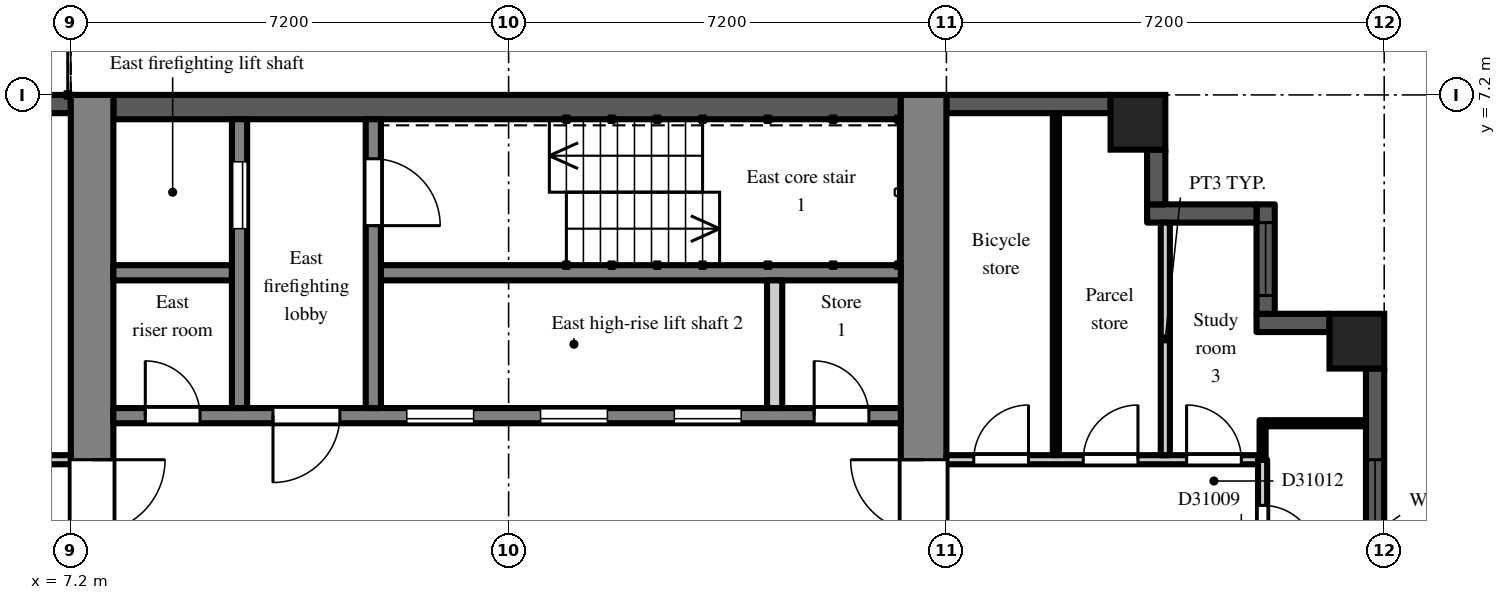
"""IFC4 building model, lengths in metres.
Left out: names, types, materials, properties, quantities, classifications, styles, units other than length and angle.
Written with IfcOpenShell. Run it as: python <this file> out.ifc"""

import sys

from ifc_helpers import new_model, si_unit, direction, frame, frame_2d, origin, origin_2d, place, context, subcontext, project, spatial, rectangle, extrude, element, fill, save


model = new_model("IFC4")
c1 = context("Model", 3, precision=1e-05, world=origin(), true_north=direction((0.0, 1.0)))
c2 = subcontext(c1, "Body", "Model", "MODEL_VIEW")
j1 = project(units=[si_unit("LENGTHUNIT", "METRE"), si_unit("PLANEANGLEUNIT", "RADIAN")], contexts=[c1])
p1 = place(None, origin())
s1 = spatial("IfcSite", under=j1, at=p1, CompositionType="ELEMENT")
p2 = place(p1, origin())
s2 = spatial("IfcBuilding", under=s1, at=p2, CompositionType="ELEMENT")
p3 = place(p2, frame((0.0, 0.0, 216.9)))
s3 = spatial("IfcBuildingStorey", under=s2, at=p3, CompositionType="ELEMENT", Elevation=216.9)
for number, where, z_axis, x_axis in (
    (1, (24.75, 6.75, 0.0), (0.0, 0.0, 1.0), (1.0, 0.0, 0.0)),
    (2, (28.35, 3.15, 0.0), (0.0, 0.0, 1.0), (1.0, 0.0, 0.0)),
):
    element("IfcColumn", number, at=place(p3, frame(where, z_axis=z_axis, x_axis=x_axis)), inside=s3, PredefinedType="COLUMN", context=c2, shape_type="SweptSolid", body=[
        extrude(rectangle(XDim=0.9, YDim=0.9, at=origin_2d()), origin(), (0.0, 0.0, 1.0), 3.0),
    ])
p4 = place(p3, frame((28.65, -2.7, 0.0), z_axis=(0.0, 0.0, 1.0), x_axis=(0.0, 1.0, 0.0)))
e3 = element("IfcWall", 3, at=p4, inside=s3, PredefinedType="SOLIDWALL", context=c2, shape_type="SweptSolid", body=[
    extrude(rectangle(XDim=5.4, YDim=0.3, at=frame_2d((2.7, 0.0))), origin(), (0.0, 0.0, 1.0), 2.3),
])
p5 = place(p4, frame((1.5, 0.0, 0.2)))
e4 = element("IfcOpeningElement", 4, at=p5, cuts=e3, PredefinedType="OPENING", context=c2, shape_type="SweptSolid", body=[
    extrude(rectangle(XDim=2.4, YDim=1.85, at=frame_2d((1.2, 0.925))), frame((0.0, 0.16, 0.0), z_axis=(0.0, -1.0, 0.0), x_axis=(1.0, 0.0, 0.0)), (0.0, 0.0, 1.0), 0.32),
])
p6 = place(p3, frame((27.9, 3.45, 0.0), z_axis=(0.0, 0.0, 1.0), x_axis=(-1.0, 0.0, 0.0)))
e5 = element("IfcWall", 5, at=p6, inside=s3, PredefinedType="SOLIDWALL", context=c2, shape_type="SweptSolid", body=[
    extrude(rectangle(XDim=1.2, YDim=0.3, at=frame_2d((0.6, 0.0))), origin(), (0.0, 0.0, 1.0), 2.6),
])
p7 = place(p3, frame((26.85, 3.6, 0.0), z_axis=(0.0, 0.0, 1.0), x_axis=(0.0, 1.0, 0.0)))
e6 = element("IfcWall", 6, at=p7, inside=s3, PredefinedType="SOLIDWALL", context=c2, shape_type="SweptSolid", body=[
    extrude(rectangle(XDim=1.8, YDim=0.3, at=frame_2d((0.9, 0.0))), origin(), (0.0, 0.0, 1.0), 2.6),
])
p8 = place(p7, frame((0.3, 0.0, 0.2)))
e7 = element("IfcOpeningElement", 7, at=p8, cuts=e6, PredefinedType="OPENING", context=c2, shape_type="SweptSolid", body=[
    extrude(rectangle(XDim=1.2, YDim=1.85, at=frame_2d((0.6, 0.925))), frame((0.0, 0.16, 0.0), z_axis=(0.0, -1.0, 0.0), x_axis=(1.0, 0.0, 0.0)), (0.0, 0.0, 1.0), 0.32),
])
p9 = place(p3, frame((26.7, 5.25, 0.0), z_axis=(0.0, 0.0, 1.0), x_axis=(-1.0, 0.0, 0.0)))
e8 = element("IfcWall", 8, at=p9, inside=s3, PredefinedType="SOLIDWALL", context=c2, shape_type="SweptSolid", body=[
    extrude(rectangle(XDim=1.8, YDim=0.3, at=frame_2d((0.9, 0.0))), origin(), (0.0, 0.0, 1.0), 2.6),
])
p10 = place(p3, frame((25.05, 5.4, 0.0), z_axis=(0.0, 0.0, 1.0), x_axis=(0.0, 1.0, 0.0)))
e9 = element("IfcWall", 9, at=p10, inside=s3, PredefinedType="SOLIDWALL", context=c2, shape_type="SweptSolid", body=[
    extrude(rectangle(XDim=0.9, YDim=0.3, at=frame_2d((0.45, 0.0))), origin(), (0.0, 0.0, 1.0), 2.6),
])
p11 = place(p3, frame((24.3, 7.05, 0.0), z_axis=(0.0, 0.0, 1.0), x_axis=(-1.0, 0.0, 0.0)))
e10 = element("IfcWall", 10, at=p11, inside=s3, PredefinedType="SOLIDWALL", context=c2, shape_type="SweptSolid", body=[
    extrude(rectangle(XDim=2.7, YDim=0.3, at=frame_2d((1.35, 0.0))), origin(), (0.0, 0.0, 1.0), 2.3),
])
p12 = place(p3, frame((7.2, 7.05, 0.0), z_axis=(0.0, 0.0, 1.0), x_axis=(-1.0, 0.0, 0.0)))
e11 = element("IfcWall", 11, at=p12, inside=s3, PredefinedType="SOLIDWALL", context=c2, shape_type="SweptSolid", body=[
    extrude(rectangle(XDim=3.0, YDim=0.3, at=frame_2d((1.5, 0.0))), origin(), (0.0, 0.0, 1.0), 2.3),
])
p13 = place(p3, frame((7.55, -7.2, 0.0), z_axis=(0.0, 0.0, 1.0), x_axis=(0.0, 1.0, 0.0)))
e12 = element("IfcWall", 12, at=p13, inside=s3, PredefinedType="SHEAR", context=c2, shape_type="SweptSolid", body=[
    extrude(rectangle(XDim=14.4, YDim=0.7, at=frame_2d((7.2, 0.0))), origin(), (0.0, 0.0, 1.0), 2.6),
])
p14 = place(p13, frame((6.0, 0.0, 0.0)))
e13 = element("IfcOpeningElement", 13, at=p14, cuts=e12, PredefinedType="OPENING", context=c2, shape_type="SweptSolid", body=[
    extrude(rectangle(XDim=2.4, YDim=2.2, at=frame_2d((1.2, 1.1))), frame((0.0, 0.36, 0.0), z_axis=(0.0, -1.0, 0.0), x_axis=(1.0, 0.0, 0.0)), (0.0, 0.0, 1.0), 0.72),
])
p15 = place(p3, frame((21.225, -7.2, 0.0), z_axis=(0.0, 0.0, 1.0), x_axis=(0.0, 1.0, 0.0)))
e14 = element("IfcWall", 14, at=p15, inside=s3, PredefinedType="SHEAR", context=c2, shape_type="SweptSolid", body=[
    extrude(rectangle(XDim=14.4, YDim=0.75, at=frame_2d((7.2, 0.0))), origin(), (0.0, 0.0, 1.0), 2.6),
])
p16 = place(p15, frame((6.0, 0.0, 0.0)))
e15 = element("IfcOpeningElement", 15, at=p16, cuts=e14, PredefinedType="OPENING", context=c2, shape_type="SweptSolid", body=[
    extrude(rectangle(XDim=2.4, YDim=2.2, at=frame_2d((1.2, 1.1))), frame((0.0, 0.385, 0.0), z_axis=(0.0, -1.0, 0.0), x_axis=(1.0, 0.0, 0.0)), (0.0, 0.0, 1.0), 0.77),
])
p17 = place(p3, frame((7.9, 7.0, 0.0), z_axis=(0.0, 0.0, 1.0), x_axis=(1.0, 0.0, 0.0)))
e16 = element("IfcWall", 16, at=p17, inside=s3, PredefinedType="SHEAR", context=c2, shape_type="SweptSolid", body=[
    extrude(rectangle(XDim=12.95, YDim=0.4, at=frame_2d((6.475, 0.0))), origin(), (0.0, 0.0, 1.0), 2.6),
])
p18 = place(p3, frame((7.9, 1.925, 0.0), z_axis=(0.0, 0.0, 1.0), x_axis=(1.0, 0.0, 0.0)))
e17 = element("IfcWall", 17, at=p18, inside=s3, PredefinedType="SHEAR", context=c2, shape_type="SweptSolid", body=[
    extrude(rectangle(XDim=12.95, YDim=0.25, at=frame_2d((6.475, 0.0))), origin(), (0.0, 0.0, 1.0), 2.6),
])
p19 = place(p18, frame((4.825, 0.0, 0.0)))
e18 = element("IfcOpeningElement", 18, at=p19, cuts=e17, PredefinedType="OPENING", context=c2, shape_type="SweptSolid", body=[
    extrude(rectangle(XDim=1.1, YDim=2.1, at=frame_2d((0.55, 1.05))), frame((0.0, 0.135, 0.0), z_axis=(0.0, -1.0, 0.0), x_axis=(1.0, 0.0, 0.0)), (0.0, 0.0, 1.0), 0.27),
])
p20 = place(p18, frame((7.025, 0.0, 0.0)))
e19 = element("IfcOpeningElement", 19, at=p20, cuts=e17, PredefinedType="OPENING", context=c2, shape_type="SweptSolid", body=[
    extrude(rectangle(XDim=1.1, YDim=2.1, at=frame_2d((0.55, 1.05))), frame((0.0, 0.135, 0.0), z_axis=(0.0, -1.0, 0.0), x_axis=(1.0, 0.0, 0.0)), (0.0, 0.0, 1.0), 0.27),
])
p21 = place(p18, frame((9.225, 0.0, 0.0)))
e20 = element("IfcOpeningElement", 20, at=p21, cuts=e17, PredefinedType="OPENING", context=c2, shape_type="SweptSolid", body=[
    extrude(rectangle(XDim=1.1, YDim=2.1, at=frame_2d((0.55, 1.05))), frame((0.0, 0.135, 0.0), z_axis=(0.0, -1.0, 0.0), x_axis=(1.0, 0.0, 0.0)), (0.0, 0.0, 1.0), 0.27),
])
p22 = place(p18, frame((0.525, 0.0, 0.0)))
e21 = element("IfcOpeningElement", 21, at=p22, cuts=e17, PredefinedType="OPENING", context=c2, shape_type="SweptSolid", body=[
    extrude(rectangle(XDim=0.9, YDim=2.1, at=frame_2d((0.45, 1.05))), frame((0.0, 0.135, 0.0), z_axis=(0.0, -1.0, 0.0), x_axis=(1.0, 0.0, 0.0)), (0.0, 0.0, 1.0), 0.27),
])
p23 = place(p18, frame((2.625, 0.0, 0.0)))
e22 = element("IfcOpeningElement", 22, at=p23, cuts=e17, PredefinedType="OPENING", context=c2, shape_type="SweptSolid", body=[
    extrude(rectangle(XDim=1.1, YDim=2.1, at=frame_2d((0.55, 1.05))), frame((0.0, 0.135, 0.0), z_axis=(0.0, -1.0, 0.0), x_axis=(1.0, 0.0, 0.0)), (0.0, 0.0, 1.0), 0.27),
])
p24 = place(p18, frame((11.525, 0.0, 0.0)))
e23 = element("IfcOpeningElement", 23, at=p24, cuts=e17, PredefinedType="OPENING", context=c2, shape_type="SweptSolid", body=[
    extrude(rectangle(XDim=0.9, YDim=2.1, at=frame_2d((0.45, 1.05))), frame((0.0, 0.135, 0.0), z_axis=(0.0, -1.0, 0.0), x_axis=(1.0, 0.0, 0.0)), (0.0, 0.0, 1.0), 0.27),
])
p25 = place(p3, frame((7.9, 4.275, 0.0), z_axis=(0.0, 0.0, 1.0), x_axis=(1.0, 0.0, 0.0)))
e24 = element("IfcWall", 24, at=p25, inside=s3, PredefinedType="SHEAR", context=c2, shape_type="SweptSolid", body=[
    extrude(rectangle(XDim=1.95, YDim=0.25, at=frame_2d((0.975, 0.0))), origin(), (0.0, 0.0, 1.0), 2.6),
])
p26 = place(p3, frame((12.3, 4.275, 0.0), z_axis=(0.0, 0.0, 1.0), x_axis=(1.0, 0.0, 0.0)))
e25 = element("IfcWall", 25, at=p26, inside=s3, PredefinedType="SHEAR", context=c2, shape_type="SweptSolid", body=[
    extrude(rectangle(XDim=8.55, YDim=0.25, at=frame_2d((4.275, 0.0))), origin(), (0.0, 0.0, 1.0), 2.6),
])
p27 = place(p3, frame((9.975, 2.05, 0.0), z_axis=(0.0, 0.0, 1.0), x_axis=(0.0, 1.0, 0.0)))
e26 = element("IfcWall", 26, at=p27, inside=s3, PredefinedType="SHEAR", context=c2, shape_type="SweptSolid", body=[
    extrude(rectangle(XDim=4.75, YDim=0.25, at=frame_2d((2.375, 0.0))), origin(), (0.0, 0.0, 1.0), 2.6),
])
p28 = place(p27, frame((2.95, 0.0, 0.0)))
e27 = element("IfcOpeningElement", 27, at=p28, cuts=e26, PredefinedType="OPENING", context=c2, shape_type="SweptSolid", body=[
    extrude(rectangle(XDim=1.1, YDim=2.1, at=frame_2d((0.55, 1.05))), frame((0.0, 0.135, 0.0), z_axis=(0.0, -1.0, 0.0), x_axis=(1.0, 0.0, 0.0)), (0.0, 0.0, 1.0), 0.27),
])
p29 = place(p3, frame((12.175, 2.05, 0.0), z_axis=(0.0, 0.0, 1.0), x_axis=(0.0, 1.0, 0.0)))
e28 = element("IfcWall", 28, at=p29, inside=s3, PredefinedType="SHEAR", context=c2, shape_type="SweptSolid", body=[
    extrude(rectangle(XDim=4.75, YDim=0.25, at=frame_2d((2.375, 0.0))), origin(), (0.0, 0.0, 1.0), 2.6),
])
p30 = place(p29, frame((3.0, 0.0, 0.0)))
e29 = element("IfcOpeningElement", 29, at=p30, cuts=e28, PredefinedType="OPENING", context=c2, shape_type="SweptSolid", body=[
    extrude(rectangle(XDim=1.1, YDim=2.1, at=frame_2d((0.55, 1.05))), frame((0.0, 0.135, 0.0), z_axis=(0.0, -1.0, 0.0), x_axis=(1.0, 0.0, 0.0)), (0.0, 0.0, 1.0), 0.27),
])
p31 = place(p3, frame((18.775, 2.05, 0.0), z_axis=(0.0, 0.0, 1.0), x_axis=(0.0, 1.0, 0.0)))
e30 = element("IfcWall", 30, at=p31, inside=s3, PredefinedType="PARTITIONING", context=c2, shape_type="SweptSolid", body=[
    extrude(rectangle(XDim=2.1, YDim=0.25, at=frame_2d((1.05, 0.0))), origin(), (0.0, 0.0, 1.0), 2.6),
])
p32 = place(p3, frame((1.275, 1.2, 0.0), z_axis=(0.0, 0.0, 1.0), x_axis=(1.0, 0.0, 0.0)))
e31 = element("IfcWall", 31, at=p32, inside=s3, PredefinedType="PARTITIONING", context=c2, shape_type="SweptSolid", body=[
    extrude(rectangle(XDim=5.925, YDim=0.15, at=frame_2d((2.962, 0.0))), origin(), (0.0, 0.0, 1.0), 2.6),
])
p33 = place(p32, frame((0.675, 0.0, 0.0)))
e32 = element("IfcOpeningElement", 32, at=p33, cuts=e31, PredefinedType="OPENING", context=c2, shape_type="SweptSolid", body=[
    extrude(rectangle(XDim=0.9, YDim=2.1, at=frame_2d((0.45, 1.05))), frame((0.0, 0.085, 0.0), z_axis=(0.0, -1.0, 0.0), x_axis=(1.0, 0.0, 0.0)), (0.0, 0.0, 1.0), 0.17),
])
p34 = place(p32, frame((3.075, 0.0, 0.0)))
e33 = element("IfcOpeningElement", 33, at=p34, cuts=e31, PredefinedType="OPENING", context=c2, shape_type="SweptSolid", body=[
    extrude(rectangle(XDim=0.9, YDim=2.1, at=frame_2d((0.45, 1.05))), frame((0.0, 0.085, 0.0), z_axis=(0.0, -1.0, 0.0), x_axis=(1.0, 0.0, 0.0)), (0.0, 0.0, 1.0), 0.17),
])
p35 = place(p3, frame((21.6, 1.2, 0.0), z_axis=(0.0, 0.0, 1.0), x_axis=(1.0, 0.0, 0.0)))
e34 = element("IfcWall", 34, at=p35, inside=s3, PredefinedType="PARTITIONING", context=c2, shape_type="SweptSolid", body=[
    extrude(rectangle(XDim=5.125, YDim=0.15, at=frame_2d((2.562, 0.0))), origin(), (0.0, 0.0, 1.0), 2.6),
])
p36 = place(p35, frame((0.45, 0.0, 0.0)))
e35 = element("IfcOpeningElement", 35, at=p36, cuts=e34, PredefinedType="OPENING", context=c2, shape_type="SweptSolid", body=[
    extrude(rectangle(XDim=0.9, YDim=2.1, at=frame_2d((0.45, 1.05))), frame((0.0, 0.085, 0.0), z_axis=(0.0, -1.0, 0.0), x_axis=(1.0, 0.0, 0.0)), (0.0, 0.0, 1.0), 0.17),
])
p37 = place(p35, frame((2.25, 0.0, 0.0)))
e36 = element("IfcOpeningElement", 36, at=p37, cuts=e34, PredefinedType="OPENING", context=c2, shape_type="SweptSolid", body=[
    extrude(rectangle(XDim=0.9, YDim=2.1, at=frame_2d((0.45, 1.05))), frame((0.0, 0.085, 0.0), z_axis=(0.0, -1.0, 0.0), x_axis=(1.0, 0.0, 0.0)), (0.0, 0.0, 1.0), 0.17),
])
p38 = place(p35, frame((3.95, 0.0, 0.0)))
e37 = element("IfcOpeningElement", 37, at=p38, cuts=e34, PredefinedType="OPENING", context=c2, shape_type="SweptSolid", body=[
    extrude(rectangle(XDim=0.9, YDim=2.1, at=frame_2d((0.45, 1.05))), frame((0.0, 0.085, 0.0), z_axis=(0.0, -1.0, 0.0), x_axis=(1.0, 0.0, 0.0)), (0.0, 0.0, 1.0), 0.17),
])
p39 = place(p3, frame((23.4, 1.275, 0.0), z_axis=(0.0, 0.0, 1.0), x_axis=(0.0, 1.0, 0.0)))
e38 = element("IfcWall", 38, at=p39, inside=s3, PredefinedType="PARTITIONING", context=c2, shape_type="SweptSolid", body=[
    extrude(rectangle(XDim=5.625, YDim=0.1, at=frame_2d((2.812, 0.0))), origin(), (0.0, 0.0, 1.0), 2.6),
])
p40 = place(p3, frame((25.2, 1.275, 0.0), z_axis=(0.0, 0.0, 1.0), x_axis=(0.0, 1.0, 0.0)))
e39 = element("IfcWall", 39, at=p40, inside=s3, PredefinedType="PARTITIONING", context=c2, shape_type="SweptSolid", body=[
    extrude(rectangle(XDim=3.825, YDim=0.15, at=frame_2d((1.913, 0.0))), origin(), (0.0, 0.0, 1.0), 2.6),
])
p41 = place(p3, frame((26.8, -1.2, 0.0), z_axis=(0.0, 0.0, 1.0), x_axis=(0.0, 1.0, 0.0)))
e40 = element("IfcWall", 40, at=p41, inside=s3, PredefinedType="PARTITIONING", context=c2, shape_type="SweptSolid", body=[
    extrude(rectangle(XDim=2.4, YDim=0.15, at=frame_2d((1.2, 0.0))), origin(), (0.0, 0.0, 1.0), 2.6),
])
p42 = place(p41, frame((0.75, 0.0, 0.0)))
e41 = element("IfcOpeningElement", 41, at=p42, cuts=e40, PredefinedType="OPENING", context=c2, shape_type="SweptSolid", body=[
    extrude(rectangle(XDim=0.9, YDim=2.1, at=frame_2d((0.45, 1.05))), frame((0.0, 0.085, 0.0), z_axis=(0.0, -1.0, 0.0), x_axis=(1.0, 0.0, 0.0)), (0.0, 0.0, 1.0), 0.17),
])
p43 = place(p3, frame((26.8, 1.2, 0.0), z_axis=(0.0, 0.0, 1.0), x_axis=(0.0, 1.0, 0.0)))
e42 = element("IfcWall", 42, at=p43, inside=s3, PredefinedType="PARTITIONING", context=c2, shape_type="SweptSolid", body=[
    extrude(rectangle(XDim=0.65, YDim=0.1, at=frame_2d((0.325, 0.0))), origin(), (0.0, 0.0, 1.0), 2.6),
])
p44 = place(p3, frame((26.85, 1.8, 0.0), z_axis=(0.0, 0.0, 1.0), x_axis=(1.0, 0.0, 0.0)))
e43 = element("IfcWall", 43, at=p44, inside=s3, PredefinedType="PARTITIONING", context=c2, shape_type="SweptSolid", body=[
    extrude(rectangle(XDim=1.65, YDim=0.1, at=frame_2d((0.825, 0.0))), origin(), (0.0, 0.0, 1.0), 2.6),
])
p45 = place(p5, origin())
e44 = element("IfcWindow", 44, at=p45, inside=s3, PartitioningType="SINGLE_PANEL", PredefinedType="WINDOW", context=c2, shape_type="SweptSolid", body=[
    extrude(rectangle(XDim=2.4, YDim=1.85, at=frame_2d((1.2, 0.925))), frame((0.0, 0.03, 0.0), z_axis=(0.0, -1.0, 0.0), x_axis=(1.0, 0.0, 0.0)), (0.0, 0.0, 1.0), 0.06),
])
fill(e4, e44)
p46 = place(p8, origin())
e45 = element("IfcWindow", 45, at=p46, inside=s3, PartitioningType="SINGLE_PANEL", PredefinedType="WINDOW", context=c2, shape_type="SweptSolid", body=[
    extrude(rectangle(XDim=1.2, YDim=1.85, at=frame_2d((0.6, 0.925))), frame((0.0, 0.03, 0.0), z_axis=(0.0, -1.0, 0.0), x_axis=(1.0, 0.0, 0.0)), (0.0, 0.0, 1.0), 0.06),
])
fill(e7, e45)
p47 = place(p19, origin())
e46 = element("IfcDoor", 46, at=p47, inside=s3, OperationType="SLIDING_TO_LEFT", PredefinedType="DOOR", context=c2, shape_type="SweptSolid", body=[
    extrude(rectangle(XDim=1.1, YDim=2.1, at=frame_2d((0.55, 1.05))), frame((0.0, 0.025, 0.0), z_axis=(0.0, -1.0, 0.0), x_axis=(1.0, 0.0, 0.0)), (0.0, 0.0, 1.0), 0.05),
])
fill(e18, e46)
p48 = place(p20, origin())
e47 = element("IfcDoor", 47, at=p48, inside=s3, OperationType="SLIDING_TO_LEFT", PredefinedType="DOOR", context=c2, shape_type="SweptSolid", body=[
    extrude(rectangle(XDim=1.1, YDim=2.1, at=frame_2d((0.55, 1.05))), frame((0.0, 0.025, 0.0), z_axis=(0.0, -1.0, 0.0), x_axis=(1.0, 0.0, 0.0)), (0.0, 0.0, 1.0), 0.05),
])
fill(e19, e47)
p49 = place(p21, origin())
e48 = element("IfcDoor", 48, at=p49, inside=s3, OperationType="SLIDING_TO_LEFT", PredefinedType="DOOR", context=c2, shape_type="SweptSolid", body=[
    extrude(rectangle(XDim=1.1, YDim=2.1, at=frame_2d((0.55, 1.05))), frame((0.0, 0.025, 0.0), z_axis=(0.0, -1.0, 0.0), x_axis=(1.0, 0.0, 0.0)), (0.0, 0.0, 1.0), 0.05),
])
fill(e20, e48)
p50 = place(p28, origin())
e49 = element("IfcDoor", 49, at=p50, inside=s3, OperationType="SLIDING_TO_LEFT", PredefinedType="DOOR", context=c2, shape_type="SweptSolid", body=[
    extrude(rectangle(XDim=1.1, YDim=2.1, at=frame_2d((0.55, 1.05))), frame((0.0, 0.025, 0.0), z_axis=(0.0, -1.0, 0.0), x_axis=(1.0, 0.0, 0.0)), (0.0, 0.0, 1.0), 0.05),
])
fill(e27, e49)
p51 = place(p30, frame((1.1, 0.0, 0.0), z_axis=(0.0, 0.0, 1.0), x_axis=(-1.0, 0.0, 0.0)))
e50 = element("IfcDoor", 50, at=p51, inside=s3, OperationType="SINGLE_SWING_RIGHT", PredefinedType="DOOR", context=c2, shape_type="SweptSolid", body=[
    extrude(rectangle(XDim=1.1, YDim=2.1, at=frame_2d((0.55, 1.05))), frame((0.0, 0.025, 0.0), z_axis=(0.0, -1.0, 0.0), x_axis=(1.0, 0.0, 0.0)), (0.0, 0.0, 1.0), 0.05),
])
fill(e29, e50)
p52 = place(p22, origin())
e51 = element("IfcDoor", 51, at=p52, inside=s3, OperationType="SINGLE_SWING_LEFT", PredefinedType="DOOR", context=c2, shape_type="SweptSolid", body=[
    extrude(rectangle(XDim=0.9, YDim=2.1, at=frame_2d((0.45, 1.05))), frame((0.0, 0.025, 0.0), z_axis=(0.0, -1.0, 0.0), x_axis=(1.0, 0.0, 0.0)), (0.0, 0.0, 1.0), 0.05),
])
fill(e21, e51)
p53 = place(p23, frame((1.1, 0.0, 0.0), z_axis=(0.0, 0.0, 1.0), x_axis=(-1.0, 0.0, 0.0)))
e52 = element("IfcDoor", 52, at=p53, inside=s3, OperationType="SINGLE_SWING_RIGHT", PredefinedType="DOOR", context=c2, shape_type="SweptSolid", body=[
    extrude(rectangle(XDim=1.1, YDim=2.1, at=frame_2d((0.55, 1.05))), frame((0.0, 0.025, 0.0), z_axis=(0.0, -1.0, 0.0), x_axis=(1.0, 0.0, 0.0)), (0.0, 0.0, 1.0), 0.05),
])
fill(e22, e52)
p54 = place(p14, frame((2.4, 0.0, 0.0), z_axis=(0.0, 0.0, 1.0), x_axis=(-1.0, 0.0, 0.0)))
e53 = element("IfcDoor", 53, at=p54, inside=s3, OperationType="DOUBLE_DOOR_DOUBLE_SWING", PredefinedType="DOOR", context=c2, shape_type="SweptSolid", body=[
    extrude(rectangle(XDim=2.4, YDim=2.2, at=frame_2d((1.2, 1.1))), frame((0.0, 0.025, 0.0), z_axis=(0.0, -1.0, 0.0), x_axis=(1.0, 0.0, 0.0)), (0.0, 0.0, 1.0), 0.05),
])
fill(e13, e53)
p55 = place(p16, origin())
e54 = element("IfcDoor", 54, at=p55, inside=s3, OperationType="DOUBLE_DOOR_DOUBLE_SWING", PredefinedType="DOOR", context=c2, shape_type="SweptSolid", body=[
    extrude(rectangle(XDim=2.4, YDim=2.2, at=frame_2d((1.2, 1.1))), frame((0.0, 0.025, 0.0), z_axis=(0.0, -1.0, 0.0), x_axis=(1.0, 0.0, 0.0)), (0.0, 0.0, 1.0), 0.05),
])
fill(e15, e54)
p56 = place(p24, origin())
e55 = element("IfcDoor", 55, at=p56, inside=s3, OperationType="SINGLE_SWING_LEFT", PredefinedType="DOOR", context=c2, shape_type="SweptSolid", body=[
    extrude(rectangle(XDim=0.9, YDim=2.1, at=frame_2d((0.45, 1.05))), frame((0.0, 0.025, 0.0), z_axis=(0.0, -1.0, 0.0), x_axis=(1.0, 0.0, 0.0)), (0.0, 0.0, 1.0), 0.05),
])
fill(e23, e55)
p57 = place(p42, frame((0.9, 0.0, 0.0), z_axis=(0.0, 0.0, 1.0), x_axis=(-1.0, 0.0, 0.0)))
e56 = element("IfcDoor", 56, at=p57, inside=s3, OperationType="SINGLE_SWING_RIGHT", PredefinedType="DOOR", context=c2, shape_type="SweptSolid", body=[
    extrude(rectangle(XDim=0.9, YDim=2.1, at=frame_2d((0.45, 1.05))), frame((0.0, 0.025, 0.0), z_axis=(0.0, -1.0, 0.0), x_axis=(1.0, 0.0, 0.0)), (0.0, 0.0, 1.0), 0.05),
])
fill(e41, e56)
p58 = place(p36, origin())
e57 = element("IfcDoor", 57, at=p58, inside=s3, OperationType="SINGLE_SWING_RIGHT", PredefinedType="DOOR", context=c2, shape_type="SweptSolid", body=[
    extrude(rectangle(XDim=0.9, YDim=2.1, at=frame_2d((0.45, 1.05))), frame((0.0, 0.025, 0.0), z_axis=(0.0, -1.0, 0.0), x_axis=(1.0, 0.0, 0.0)), (0.0, 0.0, 1.0), 0.05),
])
fill(e35, e57)
p59 = place(p37, origin())
e58 = element("IfcDoor", 58, at=p59, inside=s3, OperationType="SINGLE_SWING_RIGHT", PredefinedType="DOOR", context=c2, shape_type="SweptSolid", body=[
    extrude(rectangle(XDim=0.9, YDim=2.1, at=frame_2d((0.45, 1.05))), frame((0.0, 0.025, 0.0), z_axis=(0.0, -1.0, 0.0), x_axis=(1.0, 0.0, 0.0)), (0.0, 0.0, 1.0), 0.05),
])
fill(e36, e58)
p60 = place(p38, origin())
e59 = element("IfcDoor", 59, at=p60, inside=s3, OperationType="SINGLE_SWING_LEFT", PredefinedType="DOOR", context=c2, shape_type="SweptSolid", body=[
    extrude(rectangle(XDim=0.9, YDim=2.1, at=frame_2d((0.45, 1.05))), frame((0.0, 0.025, 0.0), z_axis=(0.0, -1.0, 0.0), x_axis=(1.0, 0.0, 0.0)), (0.0, 0.0, 1.0), 0.05),
])
fill(e37, e59)
save(model, sys.argv[1])
